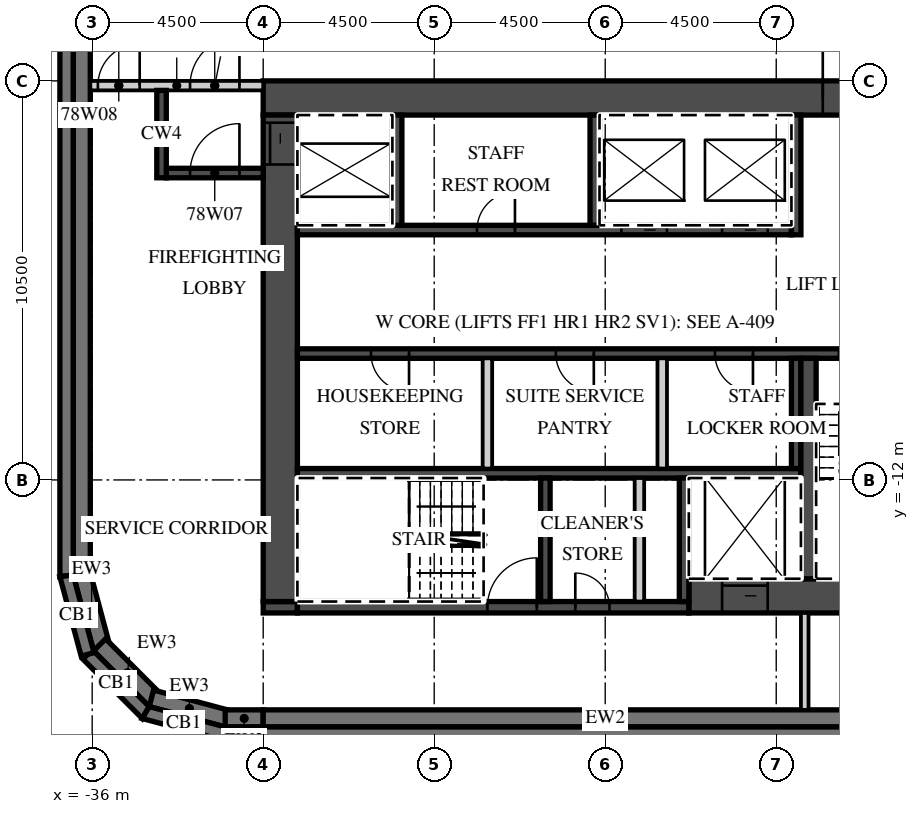
"""IFC4 building model, lengths in metres.
Left out: names, types, materials, properties, quantities, classifications, styles, units other than length and angle.
Written with IfcOpenShell. Run it as: python <this file> out.ifc"""

import sys

from ifc_helpers import new_model, si_unit, direction, frame, frame_2d, origin, place, context, subcontext, project, spatial, polyline, rectangle, outline, extrude, element, fill, save


model = new_model("IFC4")
c1 = context("Model", 3, precision=1e-05, world=origin(), true_north=direction((0.0, 1.0)))
c2 = subcontext(c1, "Body", "Model", "MODEL_VIEW")
j1 = project(units=[si_unit("LENGTHUNIT", "METRE"), si_unit("PLANEANGLEUNIT", "RADIAN")], contexts=[c1])
p1 = place(None, origin())
s1 = spatial("IfcSite", under=j1, at=p1, CompositionType="ELEMENT")
p2 = place(p1, origin())
s2 = spatial("IfcBuilding", under=s1, at=p2, CompositionType="ELEMENT")
p3 = place(p2, frame((0.0, 0.0, 308.1)))
s3 = spatial("IfcBuildingStorey", under=s2, at=p3, CompositionType="ELEMENT", Elevation=308.1)
p4 = place(p3, frame((-36.283, -14.442, 0.0), z_axis=(0.0, 0.0, 1.0), x_axis=(0.25881466832, -0.965926999034, 0.0)))
e1 = element("IfcWall", 1, at=p4, inside=s3, PredefinedType="SOLIDWALL", context=c2, shape_type="SweptSolid", body=[
    extrude(outline(polyline([(0.0, -0.225), (2.071, -0.225), (1.95, 0.225), (0.121, 0.225), (0.0, -0.225)])), origin(), (0.0, 0.0, 1.0), 5.1),
])
p5 = place(p3, frame((-35.805, -16.341, 0.0), z_axis=(0.0, 0.0, 1.0), x_axis=(0.707106781187, -0.707106781187, 0.0)))
e2 = element("IfcWall", 2, at=p5, inside=s3, PredefinedType="SOLIDWALL", context=c2, shape_type="SweptSolid", body=[
    extrude(outline(polyline([(0.0, -0.225), (2.071, -0.225), (1.95, 0.225), (0.121, 0.225), (0.0, -0.225)])), origin(), (0.0, 0.0, 1.0), 5.1),
])
p6 = place(p3, frame((-34.442, -17.747, 0.0), z_axis=(0.0, 0.0, 1.0), x_axis=(0.965926999034, -0.25881466832, 0.0)))
e3 = element("IfcWall", 3, at=p6, inside=s3, PredefinedType="SOLIDWALL", context=c2, shape_type="SweptSolid", body=[
    extrude(outline(polyline([(-0.0, -0.225), (2.07, -0.225), (1.95, 0.225), (0.12, 0.225), (-0.0, -0.225)])), origin(), (0.0, 0.0, 1.0), 5.1),
])
p7 = place(p3, frame((-32.5, -18.275, 0.0), z_axis=(0.0, 0.0, 1.0), x_axis=(1.0, 0.0, 0.0)))
e4 = element("IfcWall", 4, at=p7, inside=s3, PredefinedType="SOLIDWALL", context=c2, shape_type="SweptSolid", body=[
    extrude(rectangle(XDim=1.0, YDim=0.45, at=frame_2d((0.5, 0.0))), origin(), (0.0, 0.0, 1.0), 5.1),
])
p8 = place(p3, frame((-31.5, -18.275, 0.0), z_axis=(0.0, 0.0, 1.0), x_axis=(1.0, 0.0, 0.0)))
e5 = element("IfcWall", 5, at=p8, inside=s3, PredefinedType="SOLIDWALL", context=c2, shape_type="SweptSolid", body=[
    extrude(rectangle(XDim=18.0, YDim=0.45, at=frame_2d((9.0, 0.0))), origin(), (0.0, 0.0, 1.0), 5.1),
])
p9 = place(p3, frame((-36.275, 14.5, 0.0), z_axis=(0.0, 0.0, 1.0), x_axis=(0.0, -1.0, 0.0)))
e6 = element("IfcWall", 6, at=p9, inside=s3, PredefinedType="SOLIDWALL", context=c2, shape_type="SweptSolid", body=[
    extrude(rectangle(XDim=29.0, YDim=0.45, at=frame_2d((14.5, 0.0))), origin(), (0.0, 0.0, 1.0), 5.1),
])
p10 = place(p3, origin())
e7 = element("IfcWall", 7, at=p10, inside=s3, PredefinedType="PARAPET", context=c2, shape_type="SweptSolid", body=[
    extrude(outline(polyline([(17.122, -18.624), (17.11, -18.501), (15.864, -18.501), (-33.916, -23.562), (-33.924, -23.815), (17.122, -18.624)])), origin(), (0.0, 0.0, 1.0), 1.1),
])
p11 = place(p3, origin())
e8 = element("IfcWall", 8, at=p11, inside=s3, PredefinedType="SOLIDWALL", context=c2, shape_type="SweptSolid", body=[
    extrude(outline(polyline([(-35.997, -16.467), (-36.245, -16.714), (-34.681, -18.278), (-34.5, -17.964), (-35.997, -16.467)])), origin(), (0.0, 0.0, 1.0), 2.0),
])
p12 = place(p3, origin())
e9 = element("IfcWall", 9, at=p12, inside=s3, PredefinedType="SOLIDWALL", context=c2, shape_type="SweptSolid", body=[
    extrude(outline(polyline([(-34.5, -17.964), (-34.681, -18.278), (-32.546, -18.85), (-32.5, -18.5), (-34.5, -17.964)])), origin(), (0.0, 0.0, 1.0), 2.0),
])
p13 = place(p3, origin())
e10 = element("IfcWall", 10, at=p13, inside=s3, PredefinedType="SOLIDWALL", context=c2, shape_type="SweptSolid", body=[
    extrude(outline(polyline([(-32.5, -18.5), (-32.546, -18.85), (12.333, -18.85), (15.775, -18.5), (-32.5, -18.5)])), origin(), (0.0, 0.0, 1.0), 2.0),
])
p14 = place(p3, origin())
e11 = element("IfcWall", 11, at=p14, inside=s3, PredefinedType="SOLIDWALL", context=c2, shape_type="SweptSolid", body=[
    extrude(outline(polyline([(-36.5, 14.5), (-36.85, 14.546), (-36.85, -14.546), (-36.5, -14.5), (-36.5, 14.5)])), origin(), (0.0, 0.0, 1.0), 2.0),
])
p15 = place(p3, origin())
e12 = element("IfcWall", 12, at=p15, inside=s3, PredefinedType="SOLIDWALL", context=c2, shape_type="SweptSolid", body=[
    extrude(outline(polyline([(-36.5, -14.5), (-36.85, -14.546), (-36.29, -16.636), (-35.952, -16.545), (-36.5, -14.5)])), origin(), (0.0, 0.0, 1.0), 2.0),
])
p16 = place(p3, frame((-31.5, -1.95, 0.0), z_axis=(0.0, 0.0, 1.0), x_axis=(1.0, 0.0, 0.0)))
e13 = element("IfcWall", 13, at=p16, inside=s3, PredefinedType="SHEAR", context=c2, shape_type="SweptSolid", body=[
    extrude(rectangle(XDim=18.0, YDim=0.9, at=frame_2d((9.0, 0.0))), origin(), (0.0, 0.0, 1.0), 5.1),
])
p17 = place(p16, frame((14.725, 0.0, 0.0)))
e14 = element("IfcOpeningElement", 14, at=p17, cuts=e13, PredefinedType="OPENING", context=c2, shape_type="SweptSolid", body=[
    extrude(rectangle(XDim=1.8, YDim=2.1, at=frame_2d((0.9, 1.05))), frame((0.0, 0.46, 0.0), z_axis=(0.0, -1.0, 0.0), x_axis=(1.0, 0.0, 0.0)), (0.0, 0.0, 1.0), 0.92),
])
p18 = place(p3, frame((-20.3, -15.05, 0.0), z_axis=(0.0, 0.0, 1.0), x_axis=(1.0, 0.0, 0.0)))
e15 = element("IfcWall", 15, at=p18, inside=s3, PredefinedType="SHEAR", context=c2, shape_type="SweptSolid", body=[
    extrude(rectangle(XDim=6.8, YDim=0.9, at=frame_2d((3.4, 0.0))), origin(), (0.0, 0.0, 1.0), 5.1),
])
p19 = place(p18, frame((0.875, 0.0, 0.0)))
e16 = element("IfcOpeningElement", 16, at=p19, cuts=e15, PredefinedType="OPENING", context=c2, shape_type="SweptSolid", body=[
    extrude(rectangle(XDim=1.2, YDim=2.1, at=frame_2d((0.6, 1.05))), frame((0.0, 0.46, 0.0), z_axis=(0.0, -1.0, 0.0), x_axis=(1.0, 0.0, 0.0)), (0.0, 0.0, 1.0), 0.92),
])
p20 = place(p3, frame((-31.5, -15.35, 0.0), z_axis=(0.0, 0.0, 1.0), x_axis=(1.0, 0.0, 0.0)))
e17 = element("IfcWall", 17, at=p20, inside=s3, PredefinedType="SHEAR", context=c2, shape_type="SweptSolid", body=[
    extrude(rectangle(XDim=0.9, YDim=0.3, at=frame_2d((0.45, 0.0))), origin(), (0.0, 0.0, 1.0), 5.1),
])
p21 = place(p3, frame((-30.6, -15.35, 0.0), z_axis=(0.0, 0.0, 1.0), x_axis=(1.0, 0.0, 0.0)))
e18 = element("IfcWall", 18, at=p21, inside=s3, PredefinedType="SHEAR", context=c2, shape_type="SweptSolid", body=[
    extrude(rectangle(XDim=10.3, YDim=0.3, at=frame_2d((5.15, 0.0))), origin(), (0.0, 0.0, 1.0), 5.1),
])
p22 = place(p21, frame((5.0, 0.0, 0.0)))
e19 = element("IfcOpeningElement", 19, at=p22, cuts=e18, PredefinedType="OPENING", context=c2, shape_type="SweptSolid", body=[
    extrude(rectangle(XDim=1.3, YDim=2.1, at=frame_2d((0.65, 1.05))), frame((0.0, 0.16, 0.0), z_axis=(0.0, -1.0, 0.0), x_axis=(1.0, 0.0, 0.0)), (0.0, 0.0, 1.0), 0.32),
])
p23 = place(p21, frame((7.312, 0.0, 0.0)))
e20 = element("IfcOpeningElement", 20, at=p23, cuts=e18, PredefinedType="OPENING", context=c2, shape_type="SweptSolid", body=[
    extrude(rectangle(XDim=0.9, YDim=2.1, at=frame_2d((0.45, 1.05))), frame((0.0, 0.16, 0.0), z_axis=(0.0, -1.0, 0.0), x_axis=(1.0, 0.0, 0.0)), (0.0, 0.0, 1.0), 0.32),
])
p24 = place(p3, frame((-31.05, -15.2, 0.0), z_axis=(0.0, 0.0, 1.0), x_axis=(0.0, 1.0, 0.0)))
e21 = element("IfcWall", 21, at=p24, inside=s3, PredefinedType="SHEAR", context=c2, shape_type="SweptSolid", body=[
    extrude(rectangle(XDim=12.8, YDim=0.9, at=frame_2d((6.4, 0.0))), origin(), (0.0, 0.0, 1.0), 5.1),
])
p25 = place(p24, frame((11.5, 0.0, 0.0)))
e22 = element("IfcOpeningElement", 22, at=p25, cuts=e21, PredefinedType="OPENING", context=c2, shape_type="SweptSolid", body=[
    extrude(rectangle(XDim=1.1, YDim=2.1, at=frame_2d((0.55, 1.05))), frame((0.0, 0.46, 0.0), z_axis=(0.0, -1.0, 0.0), x_axis=(1.0, 0.0, 0.0)), (0.0, 0.0, 1.0), 0.92),
])
p26 = place(p3, frame((-30.6, -5.425, 0.0), z_axis=(0.0, 0.0, 1.0), x_axis=(1.0, 0.0, 0.0)))
e23 = element("IfcWall", 23, at=p26, inside=s3, PredefinedType="SHEAR", context=c2, shape_type="SweptSolid", body=[
    extrude(rectangle(XDim=13.0, YDim=0.25, at=frame_2d((6.5, 0.0))), origin(), (0.0, 0.0, 1.0), 5.1),
])
p27 = place(p26, frame((8.525, 0.0, 0.0)))
e24 = element("IfcOpeningElement", 24, at=p27, cuts=e23, PredefinedType="OPENING", context=c2, shape_type="SweptSolid", body=[
    extrude(rectangle(XDim=1.2, YDim=2.1, at=frame_2d((0.6, 1.05))), frame((0.0, 0.135, 0.0), z_axis=(0.0, -1.0, 0.0), x_axis=(1.0, 0.0, 0.0)), (0.0, 0.0, 1.0), 0.27),
])
p28 = place(p26, frame((11.175, 0.0, 0.0)))
e25 = element("IfcOpeningElement", 25, at=p28, cuts=e23, PredefinedType="OPENING", context=c2, shape_type="SweptSolid", body=[
    extrude(rectangle(XDim=1.2, YDim=2.1, at=frame_2d((0.6, 1.05))), frame((0.0, 0.135, 0.0), z_axis=(0.0, -1.0, 0.0), x_axis=(1.0, 0.0, 0.0)), (0.0, 0.0, 1.0), 0.27),
])
p29 = place(p26, frame((4.725, 0.0, 0.0)))
e26 = element("IfcOpeningElement", 26, at=p29, cuts=e23, PredefinedType="OPENING", context=c2, shape_type="SweptSolid", body=[
    extrude(rectangle(XDim=1.0, YDim=2.1, at=frame_2d((0.5, 1.05))), frame((0.0, 0.135, 0.0), z_axis=(0.0, -1.0, 0.0), x_axis=(1.0, 0.0, 0.0)), (0.0, 0.0, 1.0), 0.27),
])
p30 = place(p3, frame((-17.475, -5.55, 0.0), z_axis=(0.0, 0.0, 1.0), x_axis=(0.0, 1.0, 0.0)))
e27 = element("IfcWall", 27, at=p30, inside=s3, PredefinedType="SHEAR", context=c2, shape_type="SweptSolid", body=[
    extrude(rectangle(XDim=3.15, YDim=0.25, at=frame_2d((1.575, 0.0))), origin(), (0.0, 0.0, 1.0), 5.1),
])
for number, where, z_axis, x_axis in (
    (28, (-27.975, -5.3, 0.0), (0.0, 0.0, 1.0), (0.0, 1.0, 0.0)),
    (29, (-22.775, -5.3, 0.0), (0.0, 0.0, 1.0), (0.0, 1.0, 0.0)),
):
    element("IfcWall", number, at=place(p3, frame(where, z_axis=z_axis, x_axis=x_axis)), inside=s3, PredefinedType="SHEAR", context=c2, shape_type="SweptSolid", body=[
        extrude(rectangle(XDim=2.9, YDim=0.25, at=frame_2d((1.45, 0.0))), origin(), (0.0, 0.0, 1.0), 5.1),
    ])
p31 = place(p3, frame((-30.6, -8.675, 0.0), z_axis=(0.0, 0.0, 1.0), x_axis=(1.0, 0.0, 0.0)))
e30 = element("IfcWall", 30, at=p31, inside=s3, PredefinedType="SHEAR", context=c2, shape_type="SweptSolid", body=[
    extrude(rectangle(XDim=16.2, YDim=0.25, at=frame_2d((8.1, 0.0))), origin(), (0.0, 0.0, 1.0), 5.1),
])
p32 = place(p31, frame((14.25, 0.0, 0.0)))
e31 = element("IfcOpeningElement", 31, at=p32, cuts=e30, PredefinedType="OPENING", context=c2, shape_type="SweptSolid", body=[
    extrude(rectangle(XDim=1.3, YDim=2.1, at=frame_2d((0.65, 1.05))), frame((0.0, 0.135, 0.0), z_axis=(0.0, -1.0, 0.0), x_axis=(1.0, 0.0, 0.0)), (0.0, 0.0, 1.0), 0.27),
])
p33 = place(p31, frame((1.938, 0.0, 0.0)))
e32 = element("IfcOpeningElement", 32, at=p33, cuts=e30, PredefinedType="OPENING", context=c2, shape_type="SweptSolid", body=[
    extrude(rectangle(XDim=1.0, YDim=2.1, at=frame_2d((0.5, 1.05))), frame((0.0, 0.135, 0.0), z_axis=(0.0, -1.0, 0.0), x_axis=(1.0, 0.0, 0.0)), (0.0, 0.0, 1.0), 0.27),
])
p34 = place(p31, frame((6.8, 0.0, 0.0)))
e33 = element("IfcOpeningElement", 33, at=p34, cuts=e30, PredefinedType="OPENING", context=c2, shape_type="SweptSolid", body=[
    extrude(rectangle(XDim=1.0, YDim=2.1, at=frame_2d((0.5, 1.05))), frame((0.0, 0.135, 0.0), z_axis=(0.0, -1.0, 0.0), x_axis=(1.0, 0.0, 0.0)), (0.0, 0.0, 1.0), 0.27),
])
p35 = place(p31, frame((10.988, 0.0, 0.0)))
e34 = element("IfcOpeningElement", 34, at=p35, cuts=e30, PredefinedType="OPENING", context=c2, shape_type="SweptSolid", body=[
    extrude(rectangle(XDim=1.0, YDim=2.1, at=frame_2d((0.5, 1.05))), frame((0.0, 0.135, 0.0), z_axis=(0.0, -1.0, 0.0), x_axis=(1.0, 0.0, 0.0)), (0.0, 0.0, 1.0), 0.27),
])
p36 = place(p3, frame((-30.6, -11.825, 0.0), z_axis=(0.0, 0.0, 1.0), x_axis=(1.0, 0.0, 0.0)))
e35 = element("IfcWall", 35, at=p36, inside=s3, PredefinedType="SHEAR", context=c2, shape_type="SweptSolid", body=[
    extrude(rectangle(XDim=13.25, YDim=0.25, at=frame_2d((6.625, 0.0))), origin(), (0.0, 0.0, 1.0), 5.1),
])
p37 = place(p3, frame((-17.475, -11.7, 0.0), z_axis=(0.0, 0.0, 1.0), x_axis=(0.0, 1.0, 0.0)))
e36 = element("IfcWall", 36, at=p37, inside=s3, PredefinedType="SHEAR", context=c2, shape_type="SweptSolid", body=[
    extrude(rectangle(XDim=2.9, YDim=0.25, at=frame_2d((1.45, 0.0))), origin(), (0.0, 0.0, 1.0), 5.1),
])
for number, where, z_axis, x_axis in (
    (37, (-25.6, -11.7, 0.0), (0.0, 0.0, 1.0), (0.0, 1.0, 0.0)),
    (38, (-21.0, -11.7, 0.0), (0.0, 0.0, 1.0), (0.0, 1.0, 0.0)),
):
    element("IfcWall", number, at=place(p3, frame(where, z_axis=z_axis, x_axis=x_axis)), inside=s3, PredefinedType="PARTITIONING", context=c2, shape_type="SweptSolid", body=[
        extrude(rectangle(XDim=2.9, YDim=0.25, at=frame_2d((1.45, 0.0))), origin(), (0.0, 0.0, 1.0), 5.1),
    ])
p38 = place(p3, frame((-17.15, -14.6, 0.0), z_axis=(0.0, 0.0, 1.0), x_axis=(0.0, 1.0, 0.0)))
e39 = element("IfcWall", 39, at=p38, inside=s3, PredefinedType="SHEAR", context=c2, shape_type="SweptSolid", body=[
    extrude(rectangle(XDim=5.8, YDim=0.4, at=frame_2d((2.9, 0.0))), origin(), (0.0, 0.0, 1.0), 5.1),
])
for number, where, z_axis, x_axis in (
    (40, (-20.425, -15.2, 0.0), (0.0, 0.0, 1.0), (0.0, 1.0, 0.0)),
    (41, (-24.075, -15.2, 0.0), (0.0, 0.0, 1.0), (0.0, 1.0, 0.0)),
):
    element("IfcWall", number, at=place(p3, frame(where, z_axis=z_axis, x_axis=x_axis)), inside=s3, PredefinedType="SHEAR", context=c2, shape_type="SweptSolid", body=[
        extrude(rectangle(XDim=3.25, YDim=0.25, at=frame_2d((1.625, 0.0))), origin(), (0.0, 0.0, 1.0), 5.1),
    ])
p39 = place(p3, frame((-21.6, -15.2, 0.0), z_axis=(0.0, 0.0, 1.0), x_axis=(0.0, 1.0, 0.0)))
e42 = element("IfcWall", 42, at=p39, inside=s3, PredefinedType="PARTITIONING", context=c2, shape_type="SweptSolid", body=[
    extrude(rectangle(XDim=3.25, YDim=0.25, at=frame_2d((1.625, 0.0))), origin(), (0.0, 0.0, 1.0), 5.1),
])
p40 = place(p3, frame((-36.05, -1.625, 0.0), z_axis=(0.0, 0.0, 1.0), x_axis=(1.0, 0.0, 0.0)))
e43 = element("IfcWall", 43, at=p40, inside=s3, PredefinedType="PARTITIONING", context=c2, shape_type="SweptSolid", body=[
    extrude(rectangle(XDim=4.55, YDim=0.25, at=frame_2d((2.275, 0.0))), origin(), (0.0, 0.0, 1.0), 5.1),
])
p41 = place(p40, frame((2.625, 0.0, 0.0)))
e44 = element("IfcOpeningElement", 44, at=p41, cuts=e43, PredefinedType="OPENING", context=c2, shape_type="SweptSolid", body=[
    extrude(rectangle(XDim=1.3, YDim=2.1, at=frame_2d((0.65, 1.05))), frame((0.0, 0.135, 0.0), z_axis=(0.0, -1.0, 0.0), x_axis=(1.0, 0.0, 0.0)), (0.0, 0.0, 1.0), 0.27),
])
p42 = place(p40, frame((0.2, 0.0, 0.0)))
e45 = element("IfcOpeningElement", 45, at=p42, cuts=e43, PredefinedType="OPENING", context=c2, shape_type="SweptSolid", body=[
    extrude(rectangle(XDim=1.1, YDim=2.1, at=frame_2d((0.55, 1.05))), frame((0.0, 0.135, 0.0), z_axis=(0.0, -1.0, 0.0), x_axis=(1.0, 0.0, 0.0)), (0.0, 0.0, 1.0), 0.27),
])
p43 = place(p3, frame((-34.05, -3.925, 0.0), z_axis=(0.0, 0.0, 1.0), x_axis=(1.0, 0.0, 0.0)))
e46 = element("IfcWall", 46, at=p43, inside=s3, PredefinedType="SHEAR", context=c2, shape_type="SweptSolid", body=[
    extrude(rectangle(XDim=2.55, YDim=0.25, at=frame_2d((1.275, 0.0))), origin(), (0.0, 0.0, 1.0), 5.1),
])
p44 = place(p43, frame((0.625, 0.0, 0.0)))
e47 = element("IfcOpeningElement", 47, at=p44, cuts=e46, PredefinedType="OPENING", context=c2, shape_type="SweptSolid", body=[
    extrude(rectangle(XDim=1.3, YDim=2.1, at=frame_2d((0.65, 1.05))), frame((0.0, 0.135, 0.0), z_axis=(0.0, -1.0, 0.0), x_axis=(1.0, 0.0, 0.0)), (0.0, 0.0, 1.0), 0.27),
])
p45 = place(p3, frame((-34.175, -4.05, 0.0), z_axis=(0.0, 0.0, 1.0), x_axis=(0.0, 1.0, 0.0)))
e48 = element("IfcWall", 48, at=p45, inside=s3, PredefinedType="SHEAR", context=c2, shape_type="SweptSolid", body=[
    extrude(rectangle(XDim=2.3, YDim=0.25, at=frame_2d((1.15, 0.0))), origin(), (0.0, 0.0, 1.0), 5.1),
])
p46 = place(p3, frame((-17.25, -18.05, 0.0), z_axis=(0.0, 0.0, 1.0), x_axis=(0.0, 1.0, 0.0)))
e49 = element("IfcWall", 49, at=p46, inside=s3, PredefinedType="PARTITIONING", context=c2, shape_type="SweptSolid", body=[
    extrude(rectangle(XDim=2.55, YDim=0.2, at=frame_2d((1.275, 0.0))), origin(), (0.0, 0.0, 1.0), 5.1),
])
p47 = place(p27, origin())
e50 = element("IfcDoor", 50, at=p47, inside=s3, OperationType="SLIDING_TO_LEFT", PredefinedType="DOOR", context=c2, shape_type="SweptSolid", body=[
    extrude(rectangle(XDim=1.2, YDim=2.1, at=frame_2d((0.6, 1.05))), frame((0.0, 0.025, 0.0), z_axis=(0.0, -1.0, 0.0), x_axis=(1.0, 0.0, 0.0)), (0.0, 0.0, 1.0), 0.05),
])
fill(e24, e50)
p48 = place(p28, origin())
e51 = element("IfcDoor", 51, at=p48, inside=s3, OperationType="SLIDING_TO_RIGHT", PredefinedType="DOOR", context=c2, shape_type="SweptSolid", body=[
    extrude(rectangle(XDim=1.2, YDim=2.1, at=frame_2d((0.6, 1.05))), frame((0.0, 0.025, 0.0), z_axis=(0.0, -1.0, 0.0), x_axis=(1.0, 0.0, 0.0)), (0.0, 0.0, 1.0), 0.05),
])
fill(e25, e51)
p49 = place(p19, origin())
e52 = element("IfcDoor", 52, at=p49, inside=s3, OperationType="SLIDING_TO_LEFT", PredefinedType="DOOR", context=c2, shape_type="SweptSolid", body=[
    extrude(rectangle(XDim=1.2, YDim=2.1, at=frame_2d((0.6, 1.05))), frame((0.0, 0.025, 0.0), z_axis=(0.0, -1.0, 0.0), x_axis=(1.0, 0.0, 0.0)), (0.0, 0.0, 1.0), 0.05),
])
fill(e16, e52)
p50 = place(p25, origin())
e53 = element("IfcDoor", 53, at=p50, inside=s3, OperationType="SLIDING_TO_RIGHT", PredefinedType="DOOR", context=c2, shape_type="SweptSolid", body=[
    extrude(rectangle(XDim=1.1, YDim=2.1, at=frame_2d((0.55, 1.05))), frame((0.0, 0.025, 0.0), z_axis=(0.0, -1.0, 0.0), x_axis=(1.0, 0.0, 0.0)), (0.0, 0.0, 1.0), 0.05),
])
fill(e22, e53)
p51 = place(p17, origin())
e54 = element("IfcDoor", 54, at=p51, inside=s3, OperationType="DOUBLE_DOOR_DOUBLE_SWING", PredefinedType="DOOR", context=c2, shape_type="SweptSolid", body=[
    extrude(rectangle(XDim=1.8, YDim=2.1, at=frame_2d((0.9, 1.05))), frame((0.0, 0.025, 0.0), z_axis=(0.0, -1.0, 0.0), x_axis=(1.0, 0.0, 0.0)), (0.0, 0.0, 1.0), 0.05),
])
fill(e14, e54)
p52 = place(p41, origin())
e55 = element("IfcDoor", 55, at=p52, inside=s3, OperationType="SINGLE_SWING_RIGHT", PredefinedType="DOOR", context=c2, shape_type="SweptSolid", body=[
    extrude(rectangle(XDim=1.3, YDim=2.1, at=frame_2d((0.65, 1.05))), frame((0.0, 0.025, 0.0), z_axis=(0.0, -1.0, 0.0), x_axis=(1.0, 0.0, 0.0)), (0.0, 0.0, 1.0), 0.05),
])
fill(e44, e55)
p53 = place(p44, origin())
e56 = element("IfcDoor", 56, at=p53, inside=s3, OperationType="SINGLE_SWING_RIGHT", PredefinedType="DOOR", context=c2, shape_type="SweptSolid", body=[
    extrude(rectangle(XDim=1.3, YDim=2.1, at=frame_2d((0.65, 1.05))), frame((0.0, 0.025, 0.0), z_axis=(0.0, -1.0, 0.0), x_axis=(1.0, 0.0, 0.0)), (0.0, 0.0, 1.0), 0.05),
])
fill(e47, e56)
p54 = place(p42, origin())
e57 = element("IfcDoor", 57, at=p54, inside=s3, OperationType="SINGLE_SWING_RIGHT", PredefinedType="DOOR", context=c2, shape_type="SweptSolid", body=[
    extrude(rectangle(XDim=1.1, YDim=2.1, at=frame_2d((0.55, 1.05))), frame((0.0, 0.025, 0.0), z_axis=(0.0, -1.0, 0.0), x_axis=(1.0, 0.0, 0.0)), (0.0, 0.0, 1.0), 0.05),
])
fill(e45, e57)
p55 = place(p32, origin())
e58 = element("IfcDoor", 58, at=p55, inside=s3, OperationType="SINGLE_SWING_RIGHT", PredefinedType="DOOR", context=c2, shape_type="SweptSolid", body=[
    extrude(rectangle(XDim=1.3, YDim=2.1, at=frame_2d((0.65, 1.05))), frame((0.0, 0.025, 0.0), z_axis=(0.0, -1.0, 0.0), x_axis=(1.0, 0.0, 0.0)), (0.0, 0.0, 1.0), 0.05),
])
fill(e31, e58)
p56 = place(p22, origin())
e59 = element("IfcDoor", 59, at=p56, inside=s3, OperationType="SINGLE_SWING_RIGHT", PredefinedType="DOOR", context=c2, shape_type="SweptSolid", body=[
    extrude(rectangle(XDim=1.3, YDim=2.1, at=frame_2d((0.65, 1.05))), frame((0.0, 0.025, 0.0), z_axis=(0.0, -1.0, 0.0), x_axis=(1.0, 0.0, 0.0)), (0.0, 0.0, 1.0), 0.05),
])
fill(e19, e59)
p57 = place(p23, origin())
e60 = element("IfcDoor", 60, at=p57, inside=s3, OperationType="SINGLE_SWING_LEFT", PredefinedType="DOOR", context=c2, shape_type="SweptSolid", body=[
    extrude(rectangle(XDim=0.9, YDim=2.1, at=frame_2d((0.45, 1.05))), frame((0.0, 0.025, 0.0), z_axis=(0.0, -1.0, 0.0), x_axis=(1.0, 0.0, 0.0)), (0.0, 0.0, 1.0), 0.05),
])
fill(e20, e60)
p58 = place(p33, origin())
e61 = element("IfcDoor", 61, at=p58, inside=s3, OperationType="SINGLE_SWING_RIGHT", PredefinedType="DOOR", context=c2, shape_type="SweptSolid", body=[
    extrude(rectangle(XDim=1.0, YDim=2.1, at=frame_2d((0.5, 1.05))), frame((0.0, 0.025, 0.0), z_axis=(0.0, -1.0, 0.0), x_axis=(1.0, 0.0, 0.0)), (0.0, 0.0, 1.0), 0.05),
])
fill(e32, e61)
p59 = place(p34, origin())
e62 = element("IfcDoor", 62, at=p59, inside=s3, OperationType="SINGLE_SWING_RIGHT", PredefinedType="DOOR", context=c2, shape_type="SweptSolid", body=[
    extrude(rectangle(XDim=1.0, YDim=2.1, at=frame_2d((0.5, 1.05))), frame((0.0, 0.025, 0.0), z_axis=(0.0, -1.0, 0.0), x_axis=(1.0, 0.0, 0.0)), (0.0, 0.0, 1.0), 0.05),
])
fill(e33, e62)
p60 = place(p35, origin())
e63 = element("IfcDoor", 63, at=p60, inside=s3, OperationType="SINGLE_SWING_RIGHT", PredefinedType="DOOR", context=c2, shape_type="SweptSolid", body=[
    extrude(rectangle(XDim=1.0, YDim=2.1, at=frame_2d((0.5, 1.05))), frame((0.0, 0.025, 0.0), z_axis=(0.0, -1.0, 0.0), x_axis=(1.0, 0.0, 0.0)), (0.0, 0.0, 1.0), 0.05),
])
fill(e34, e63)
p61 = place(p29, origin())
e64 = element("IfcDoor", 64, at=p61, inside=s3, OperationType="SINGLE_SWING_RIGHT", PredefinedType="DOOR", context=c2, shape_type="SweptSolid", body=[
    extrude(rectangle(XDim=1.0, YDim=2.1, at=frame_2d((0.5, 1.05))), frame((0.0, 0.025, 0.0), z_axis=(0.0, -1.0, 0.0), x_axis=(1.0, 0.0, 0.0)), (0.0, 0.0, 1.0), 0.05),
])
fill(e26, e64)
save(model, sys.argv[1])
